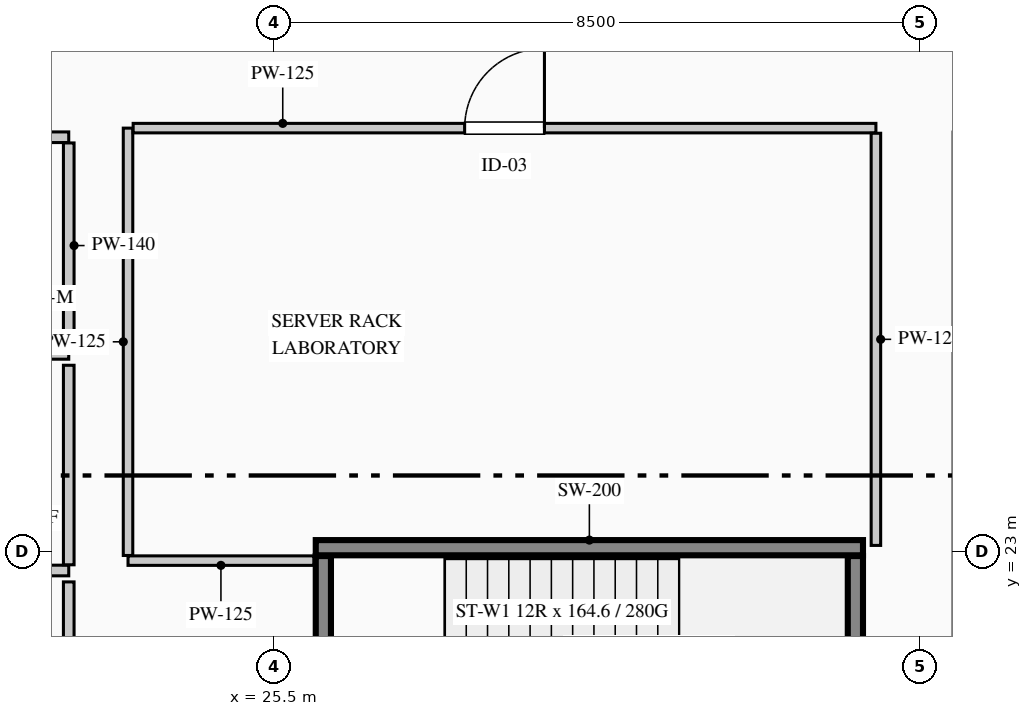
"""IFC4 building model, lengths in metres.
Left out: names, types, materials, properties, quantities, classifications, styles, units other than length and angle.
Written with IfcOpenShell. Run it as: python <this file> out.ifc"""

import sys

from ifc_helpers import new_model, si_unit, direction, frame, frame_2d, origin, place, context, subcontext, project, spatial, rectangle, extrude, element, fill, save


model = new_model("IFC4")
c1 = context("Model", 3, precision=1e-05, world=origin(), true_north=direction((0.0, 1.0)))
c2 = subcontext(c1, "Body", "Model", "MODEL_VIEW")
j1 = project(units=[si_unit("LENGTHUNIT", "METRE"), si_unit("PLANEANGLEUNIT", "RADIAN")], contexts=[c1])
p1 = place(None, origin())
s1 = spatial("IfcSite", under=j1, at=p1, CompositionType="ELEMENT")
p2 = place(p1, origin())
s2 = spatial("IfcBuilding", under=s1, at=p2, CompositionType="ELEMENT")
p3 = place(p2, frame((0.0, 0.0, 123.25)))
s3 = spatial("IfcBuildingStorey", under=s2, at=p3, CompositionType="ELEMENT", Elevation=123.25)
p4 = place(p3, frame((26.05, 23.05, 0.0), z_axis=(0.0, 0.0, 1.0), x_axis=(1.0, 0.0, 0.0)))
e1 = element("IfcWall", 1, at=p4, inside=s3, PredefinedType="SHEAR", context=c2, shape_type="SweptSolid", body=[
    extrude(rectangle(XDim=7.2, YDim=0.2, at=frame_2d((3.6, 0.0))), origin(), (0.0, 0.0, 1.0), 3.95),
])
for number, where, z_axis, x_axis in (
    (2, (26.15, 19.81, 0.0), (0.0, 0.0, 1.0), (0.0, 1.0, 0.0)),
    (3, (33.15, 19.81, 0.0), (0.0, 0.0, 1.0), (0.0, 1.0, 0.0)),
):
    element("IfcWall", number, at=place(p3, frame(where, z_axis=z_axis, x_axis=x_axis)), inside=s3, PredefinedType="SHEAR", context=c2, shape_type="SweptSolid", body=[
        extrude(rectangle(XDim=3.13, YDim=0.2, at=frame_2d((1.565, 0.0))), origin(), (0.0, 0.0, 1.0), 3.95),
    ])
p5 = place(p3, frame((22.8, 25.6, 0.0), z_axis=(0.0, 0.0, 1.0), x_axis=(-1.0, 0.0, 0.0)))
e4 = element("IfcWall", 4, at=p5, inside=s3, PredefinedType="PARTITIONING", context=c2, shape_type="SweptSolid", body=[
    extrude(rectangle(XDim=1.89, YDim=0.14, at=frame_2d((0.945, 0.0))), origin(), (0.0, 0.0, 1.0), 3.69),
])
p6 = place(p3, frame((20.985, 28.45, 0.0), z_axis=(0.0, 0.0, 1.0), x_axis=(1.0, 0.0, 0.0)))
e5 = element("IfcWall", 5, at=p6, inside=s3, PredefinedType="PARTITIONING", context=c2, shape_type="SweptSolid", body=[
    extrude(rectangle(XDim=1.815, YDim=0.14, at=frame_2d((0.907, 0.0))), origin(), (0.0, 0.0, 1.0), 3.69),
])
p7 = place(p3, frame((22.8, 28.375, 0.0), z_axis=(0.0, 0.0, 1.0), x_axis=(0.0, -1.0, 0.0)))
e6 = element("IfcWall", 6, at=p7, inside=s3, PredefinedType="PARTITIONING", context=c2, shape_type="SweptSolid", body=[
    extrude(rectangle(XDim=2.7, YDim=0.14, at=frame_2d((1.35, 0.0))), origin(), (0.0, 0.0, 1.0), 3.375),
])
p8 = place(p3, frame((22.8, 22.75, 0.0), z_axis=(0.0, 0.0, 1.0), x_axis=(-1.0, 0.0, 0.0)))
e7 = element("IfcWall", 7, at=p8, inside=s3, PredefinedType="PARTITIONING", context=c2, shape_type="SweptSolid", body=[
    extrude(rectangle(XDim=1.89, YDim=0.14, at=frame_2d((0.945, 0.0))), origin(), (0.0, 0.0, 1.0), 3.69),
])
p9 = place(p3, frame((22.8, 25.45, 0.0), z_axis=(0.0, 0.0, 1.0), x_axis=(0.0, -1.0, 0.0)))
e8 = element("IfcWall", 8, at=p9, inside=s3, PredefinedType="PARTITIONING", context=c2, shape_type="SweptSolid", body=[
    extrude(rectangle(XDim=2.625, YDim=0.14, at=frame_2d((1.312, 0.0))), origin(), (0.0, 0.0, 1.0), 3.375),
])
p10 = place(p3, frame((22.8, 22.6, 0.0), z_axis=(0.0, 0.0, 1.0), x_axis=(0.0, -1.0, 0.0)))
e9 = element("IfcWall", 9, at=p10, inside=s3, PredefinedType="PARTITIONING", context=c2, shape_type="SweptSolid", body=[
    extrude(rectangle(XDim=2.675, YDim=0.14, at=frame_2d((1.337, 0.0))), origin(), (0.0, 0.0, 1.0), 3.375),
])
p11 = place(p3, frame((26.025, 22.88, 0.0), z_axis=(0.0, 0.0, 1.0), x_axis=(-1.0, 0.0, 0.0)))
e10 = element("IfcWall", 10, at=p11, inside=s3, PredefinedType="PARTITIONING", context=c2, shape_type="SweptSolid", body=[
    extrude(rectangle(XDim=2.445, YDim=0.125, at=frame_2d((1.222, 0.0))), origin(), (0.0, 0.0, 1.0), 3.69),
])
p12 = place(p3, frame((23.58, 22.948, 0.0), z_axis=(0.0, 0.0, 1.0), x_axis=(0.0, 1.0, 0.0)))
e11 = element("IfcWall", 11, at=p12, inside=s3, PredefinedType="PARTITIONING", context=c2, shape_type="SweptSolid", body=[
    extrude(rectangle(XDim=5.623, YDim=0.125, at=frame_2d((2.811, 0.0))), origin(), (0.0, 0.0, 1.0), 3.69),
])
p13 = place(p3, frame((23.647, 28.57, 0.0), z_axis=(0.0, 0.0, 1.0), x_axis=(1.0, 0.0, 0.0)))
e12 = element("IfcWall", 12, at=p13, inside=s3, PredefinedType="PARTITIONING", context=c2, shape_type="SweptSolid", body=[
    extrude(rectangle(XDim=9.772, YDim=0.125, at=frame_2d((4.886, 0.0))), origin(), (0.0, 0.0, 1.0), 3.375),
])
p14 = place(p13, frame((4.361, 0.0, 0.0)))
e13 = element("IfcOpeningElement", 13, at=p14, cuts=e12, PredefinedType="OPENING", context=c2, shape_type="SweptSolid", body=[
    extrude(rectangle(XDim=1.05, YDim=2.15, at=frame_2d((0.525, 1.075))), frame((0.0, 0.073, 0.0), z_axis=(0.0, -1.0, 0.0), x_axis=(1.0, 0.0, 0.0)), (0.0, 0.0, 1.0), 0.145),
])
p15 = place(p3, frame((33.42, 28.502, 0.0), z_axis=(0.0, 0.0, 1.0), x_axis=(0.0, -1.0, 0.0)))
e14 = element("IfcWall", 14, at=p15, inside=s3, PredefinedType="PARTITIONING", context=c2, shape_type="SweptSolid", body=[
    extrude(rectangle(XDim=5.422, YDim=0.125, at=frame_2d((2.711, 0.0))), origin(), (0.0, 0.0, 1.0), 3.69),
])
p16 = place(p14, origin())
e15 = element("IfcDoor", 15, at=p16, inside=s3, OperationType="SINGLE_SWING_RIGHT", PredefinedType="DOOR", context=c2, shape_type="SweptSolid", body=[
    extrude(rectangle(XDim=1.05, YDim=2.15, at=frame_2d((0.525, 1.075))), frame((0.0, 0.025, 0.0), z_axis=(0.0, -1.0, 0.0), x_axis=(1.0, 0.0, 0.0)), (0.0, 0.0, 1.0), 0.05),
])
fill(e13, e15)
save(model, sys.argv[1])
